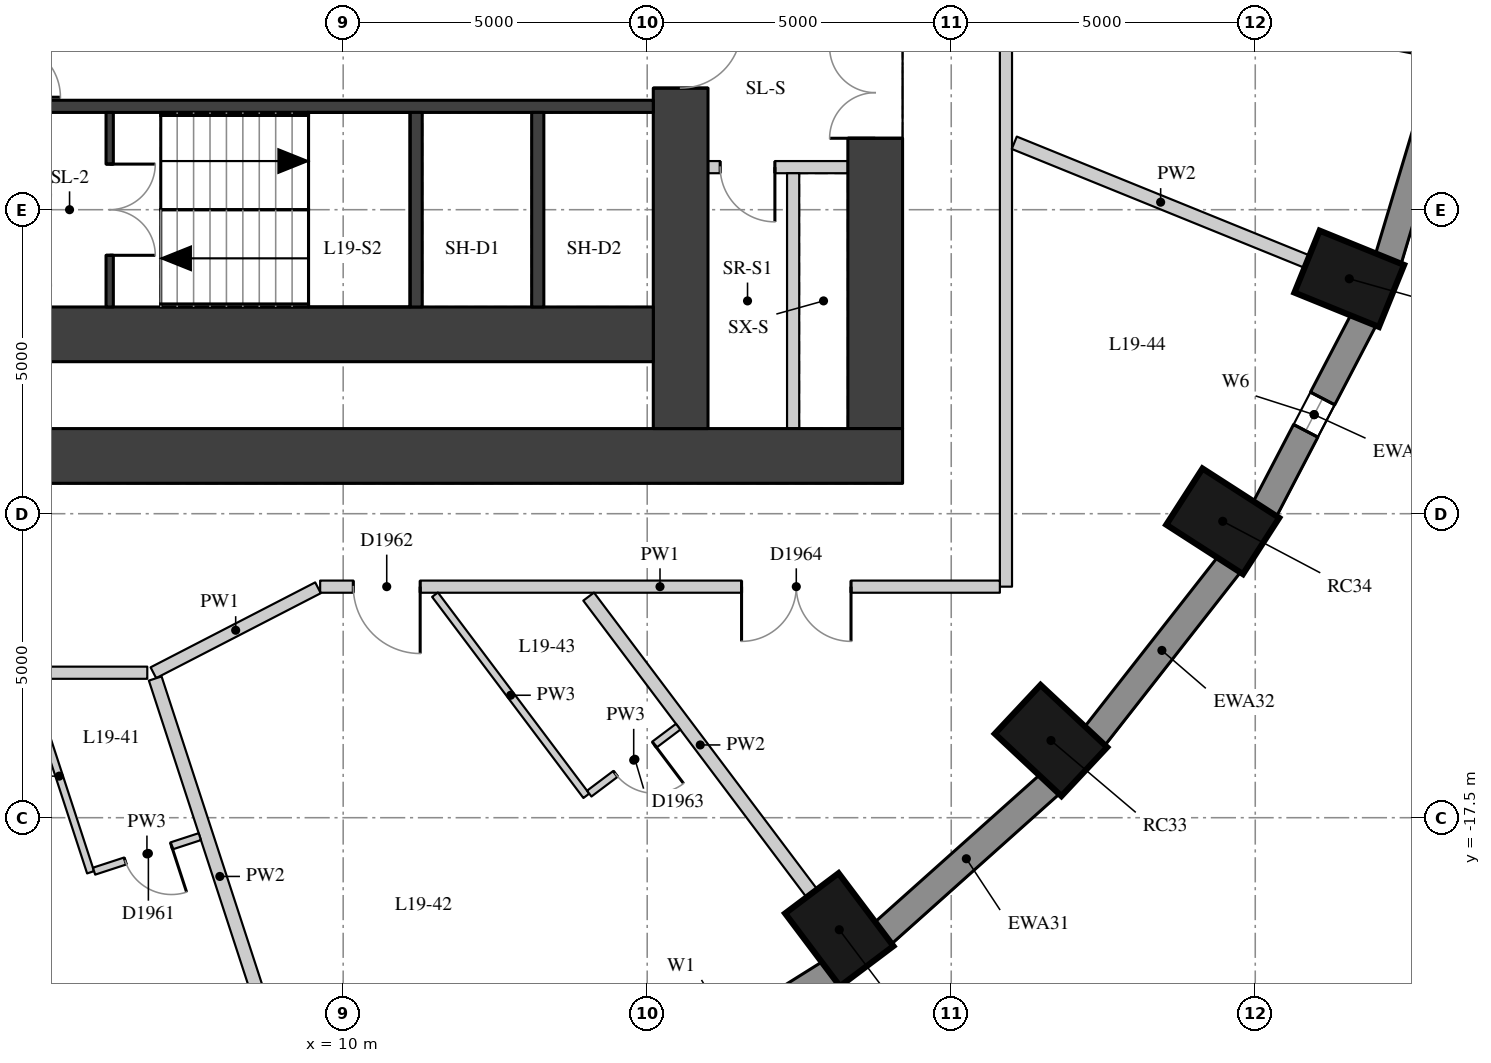
"""IFC4 building model, lengths in metres.
Left out: names, types, materials, properties, quantities, classifications, styles, units other than length and angle.
Written with IfcOpenShell. Run it as: python <this file> out.ifc"""

import sys

from ifc_helpers import new_model, si_unit, direction, frame, frame_2d, origin, origin_2d, place, context, subcontext, project, spatial, rectangle, extrude, element, fill, save


model = new_model("IFC4")
c1 = context("Model", 3, precision=1e-05, world=origin(), true_north=direction((0.0, 1.0)))
c2 = subcontext(c1, "Body", "Model", "MODEL_VIEW")
j1 = project(units=[si_unit("LENGTHUNIT", "METRE"), si_unit("PLANEANGLEUNIT", "RADIAN")], contexts=[c1])
p1 = place(None, origin())
s1 = spatial("IfcSite", under=j1, at=p1, CompositionType="ELEMENT")
p2 = place(p1, origin())
s2 = spatial("IfcBuilding", under=s1, at=p2, CompositionType="ELEMENT")
p3 = place(p2, frame((0.0, 0.0, 71.2)))
s3 = spatial("IfcBuildingStorey", under=s2, at=p3, CompositionType="ELEMENT", Elevation=71.2)
for number, where, z_axis, x_axis in (
    (1, (18.159, -19.343, 0.0), (0.0, 0.0, 1.0), (0.601, -0.799, 0.0)),
    (2, (21.641, -16.23, 0.0), (0.0, 0.0, 1.0), (0.73, -0.683, 0.0)),
    (3, (24.465, -12.625, 0.0), (0.0, 0.0, 1.0), (0.841, -0.541, 0.0)),
    (4, (26.546, -8.636, 0.0), (0.0, 0.0, 1.0), (0.927, -0.376, 0.0)),
    (5, (27.821, -4.385, 0.0), (0.0, 0.0, 1.0), (0.981, -0.193, 0.0)),
):
    element("IfcColumn", number, at=place(p3, frame(where, z_axis=z_axis, x_axis=x_axis)), inside=s3, PredefinedType="COLUMN", context=c2, shape_type="SweptSolid", body=[
        extrude(rectangle(XDim=1.5, YDim=1.1, at=origin_2d()), origin(), (0.0, 0.0, 1.0), 3.3),
    ])
p4 = place(p3, frame((14.817, -22.051, 0.0), z_axis=(0.0, 0.0, 1.0), x_axis=(0.847635480093, 0.530579016629, 0.0)))
e6 = element("IfcWall", 6, at=p4, inside=s3, PredefinedType="SOLIDWALL", context=c2, shape_type="SweptSolid", body=[
    extrude(rectangle(XDim=3.782, YDim=0.45, at=frame_2d((1.891, 0.0))), origin(), (0.0, 0.0, 1.0), 3.02),
])
p5 = place(p4, frame((0.791, 0.0, 0.4)))
e7 = element("IfcOpeningElement", 7, at=p5, cuts=e6, PredefinedType="OPENING", context=c2, shape_type="SweptSolid", body=[
    extrude(rectangle(XDim=2.2, YDim=1.75, at=frame_2d((1.1, 0.875))), frame((0.0, 0.235, 0.0), z_axis=(0.0, -1.0, 0.0), x_axis=(1.0, 0.0, 0.0)), (0.0, 0.0, 1.0), 0.47),
])
p6 = place(p3, frame((18.871, -19.407, 0.0), z_axis=(0.0, 0.0, 1.0), x_axis=(0.745526233716, 0.66647628228, 0.0)))
e8 = element("IfcWall", 8, at=p6, inside=s3, PredefinedType="SOLIDWALL", context=c2, shape_type="SweptSolid", body=[
    extrude(rectangle(XDim=3.697, YDim=0.45, at=frame_2d((1.848, 0.0))), origin(), (0.0, 0.0, 1.0), 3.02),
])
p7 = place(p3, frame((22.352, -16.17, 0.0), z_axis=(0.0, 0.0, 1.0), x_axis=(0.616661975264, 0.787228053529, 0.0)))
e9 = element("IfcWall", 9, at=p7, inside=s3, PredefinedType="SOLIDWALL", context=c2, shape_type="SweptSolid", body=[
    extrude(rectangle(XDim=3.61, YDim=0.45, at=frame_2d((1.805, 0.0))), origin(), (0.0, 0.0, 1.0), 3.02),
])
p8 = place(p3, frame((25.152, -12.437, 0.0), z_axis=(0.0, 0.0, 1.0), x_axis=(0.462492775226, 0.886623050041, 0.0)))
e10 = element("IfcWall", 10, at=p8, inside=s3, PredefinedType="SOLIDWALL", context=c2, shape_type="SweptSolid", body=[
    extrude(rectangle(XDim=3.532, YDim=0.45, at=frame_2d((1.766, 0.0))), origin(), (0.0, 0.0, 1.0), 3.02),
])
p9 = place(p8, frame((1.466, 0.0, 0.4)))
e11 = element("IfcOpeningElement", 11, at=p9, cuts=e10, PredefinedType="OPENING", context=c2, shape_type="SweptSolid", body=[
    extrude(rectangle(XDim=0.6, YDim=1.75, at=frame_2d((0.3, 0.875))), frame((0.0, 0.235, 0.0), z_axis=(0.0, -1.0, 0.0), x_axis=(1.0, 0.0, 0.0)), (0.0, 0.0, 1.0), 0.47),
])
p10 = place(p3, frame((27.185, -8.323, 0.0), z_axis=(0.0, 0.0, 1.0), x_axis=(0.287064133733, 0.957911364963, 0.0)))
e12 = element("IfcWall", 12, at=p10, inside=s3, PredefinedType="SOLIDWALL", context=c2, shape_type="SweptSolid", body=[
    extrude(rectangle(XDim=3.473, YDim=0.45, at=frame_2d((1.737, 0.0))), origin(), (0.0, 0.0, 1.0), 3.02),
])
p11 = place(p3, frame((18.75, -11.1, 0.0), z_axis=(0.0, 0.0, 1.0), x_axis=(0.0, 1.0, 0.0)))
e13 = element("IfcWall", 13, at=p11, inside=s3, PredefinedType="SHEAR", context=c2, shape_type="SweptSolid", body=[
    extrude(rectangle(XDim=22.2, YDim=0.9, at=frame_2d((11.1, 0.0))), origin(), (0.0, 0.0, 1.0), 3.02),
])
p12 = place(p11, frame((15.675, 0.0, 0.0)))
e14 = element("IfcOpeningElement", 14, at=p12, cuts=e13, PredefinedType="OPENING", context=c2, shape_type="SweptSolid", body=[
    extrude(rectangle(XDim=1.5, YDim=2.1, at=frame_2d((0.75, 1.05))), frame((0.0, 0.46, 0.0), z_axis=(0.0, -1.0, 0.0), x_axis=(1.0, 0.0, 0.0)), (0.0, 0.0, 1.0), 0.92),
])
p13 = place(p11, frame((4.775, 0.0, 0.0)))
e15 = element("IfcOpeningElement", 15, at=p13, cuts=e13, PredefinedType="OPENING", context=c2, shape_type="SweptSolid", body=[
    extrude(rectangle(XDim=1.5, YDim=2.1, at=frame_2d((0.75, 1.05))), frame((0.0, 0.46, 0.0), z_axis=(0.0, -1.0, 0.0), x_axis=(1.0, 0.0, 0.0)), (0.0, 0.0, 1.0), 0.92),
])
p14 = place(p3, frame((4.0, -11.55, 0.0), z_axis=(0.0, 0.0, 1.0), x_axis=(1.0, 0.0, 0.0)))
e16 = element("IfcWall", 16, at=p14, inside=s3, PredefinedType="SHEAR", context=c2, shape_type="SweptSolid", body=[
    extrude(rectangle(XDim=15.2, YDim=0.9, at=frame_2d((7.6, 0.0))), origin(), (0.0, 0.0, 1.0), 3.02),
])
p15 = place(p3, frame((15.55, -11.1, 0.0), z_axis=(0.0, 0.0, 1.0), x_axis=(0.0, 1.0, 0.0)))
e17 = element("IfcWall", 17, at=p15, inside=s3, PredefinedType="SHEAR", context=c2, shape_type="SweptSolid", body=[
    extrude(rectangle(XDim=22.2, YDim=0.9, at=frame_2d((11.1, 0.0))), origin(), (0.0, 0.0, 1.0), 3.02),
])
p16 = place(p15, frame((15.6, 0.0, 0.0)))
e18 = element("IfcOpeningElement", 18, at=p16, cuts=e17, PredefinedType="OPENING", context=c2, shape_type="SweptSolid", body=[
    extrude(rectangle(XDim=1.0, YDim=2.1, at=frame_2d((0.5, 1.05))), frame((0.0, 0.46, 0.0), z_axis=(0.0, -1.0, 0.0), x_axis=(1.0, 0.0, 0.0)), (0.0, 0.0, 1.0), 0.92),
])
p17 = place(p15, frame((5.6, 0.0, 0.0)))
e19 = element("IfcOpeningElement", 19, at=p17, cuts=e17, PredefinedType="OPENING", context=c2, shape_type="SweptSolid", body=[
    extrude(rectangle(XDim=1.0, YDim=2.1, at=frame_2d((0.5, 1.05))), frame((0.0, 0.46, 0.0), z_axis=(0.0, -1.0, 0.0), x_axis=(1.0, 0.0, 0.0)), (0.0, 0.0, 1.0), 0.92),
])
p18 = place(p3, frame((4.9, -9.55, 0.0), z_axis=(0.0, 0.0, 1.0), x_axis=(1.0, 0.0, 0.0)))
e20 = element("IfcWall", 20, at=p18, inside=s3, PredefinedType="SHEAR", context=c2, shape_type="SweptSolid", body=[
    extrude(rectangle(XDim=10.2, YDim=0.9, at=frame_2d((5.1, 0.0))), origin(), (0.0, 0.0, 1.0), 3.02),
])
p19 = place(p3, frame((4.9, -5.8, 0.0), z_axis=(0.0, 0.0, 1.0), x_axis=(1.0, 0.0, 0.0)))
e21 = element("IfcWall", 21, at=p19, inside=s3, PredefinedType="SHEAR", context=c2, shape_type="SweptSolid", body=[
    extrude(rectangle(XDim=10.2, YDim=0.2, at=frame_2d((5.1, 0.0))), origin(), (0.0, 0.0, 1.0), 3.02),
])
for number, where, z_axis, x_axis in (
    (22, (11.2, -9.1, 0.0), (0.0, 0.0, 1.0), (0.0, 1.0, 0.0)),
    (23, (13.2, -9.1, 0.0), (0.0, 0.0, 1.0), (0.0, 1.0, 0.0)),
):
    element("IfcWall", number, at=place(p3, frame(where, z_axis=z_axis, x_axis=x_axis)), inside=s3, PredefinedType="SHEAR", context=c2, shape_type="SweptSolid", body=[
        extrude(rectangle(XDim=3.2, YDim=0.2, at=frame_2d((1.6, 0.0))), origin(), (0.0, 0.0, 1.0), 3.02),
    ])
p20 = place(p3, frame((6.16, -9.1, 0.0), z_axis=(0.0, 0.0, 1.0), x_axis=(0.0, 1.0, 0.0)))
e24 = element("IfcWall", 24, at=p20, inside=s3, PredefinedType="SHEAR", context=c2, shape_type="SweptSolid", body=[
    extrude(rectangle(XDim=3.2, YDim=0.12, at=frame_2d((1.6, 0.0))), origin(), (0.0, 0.0, 1.0), 3.02),
])
p21 = place(p20, frame((0.85, 0.0, 0.0)))
e25 = element("IfcOpeningElement", 25, at=p21, cuts=e24, PredefinedType="OPENING", context=c2, shape_type="SweptSolid", body=[
    extrude(rectangle(XDim=1.5, YDim=2.1, at=frame_2d((0.75, 1.05))), frame((0.0, 0.07, 0.0), z_axis=(0.0, -1.0, 0.0), x_axis=(1.0, 0.0, 0.0)), (0.0, 0.0, 1.0), 0.14),
])
p22 = place(p3, frame((16.0, -6.8, 0.0), z_axis=(0.0, 0.0, 1.0), x_axis=(1.0, 0.0, 0.0)))
e26 = element("IfcWall", 26, at=p22, inside=s3, PredefinedType="PARTITIONING", context=c2, shape_type="SweptSolid", body=[
    extrude(rectangle(XDim=2.3, YDim=0.2, at=frame_2d((1.15, 0.0))), origin(), (0.0, 0.0, 1.0), 3.02),
])
p23 = place(p22, frame((0.2, 0.0, 0.0)))
e27 = element("IfcOpeningElement", 27, at=p23, cuts=e26, PredefinedType="OPENING", context=c2, shape_type="SweptSolid", body=[
    extrude(rectangle(XDim=0.9, YDim=2.1, at=frame_2d((0.45, 1.05))), frame((0.0, 0.11, 0.0), z_axis=(0.0, -1.0, 0.0), x_axis=(1.0, 0.0, 0.0)), (0.0, 0.0, 1.0), 0.22),
])
p24 = place(p3, frame((17.4, -11.1, 0.0), z_axis=(0.0, 0.0, 1.0), x_axis=(0.0, 1.0, 0.0)))
e28 = element("IfcWall", 28, at=p24, inside=s3, PredefinedType="PARTITIONING", context=c2, shape_type="SweptSolid", body=[
    extrude(rectangle(XDim=4.2, YDim=0.2, at=frame_2d((2.1, 0.0))), origin(), (0.0, 0.0, 1.0), 3.02),
])
p25 = place(p3, frame((20.9, 13.7, 0.0), z_axis=(0.0, 0.0, 1.0), x_axis=(0.0, -1.0, 0.0)))
e29 = element("IfcWall", 29, at=p25, inside=s3, PredefinedType="PARTITIONING", context=c2, shape_type="SweptSolid", body=[
    extrude(rectangle(XDim=27.4, YDim=0.2, at=frame_2d((13.7, 0.0))), origin(), (0.0, 0.0, 1.0), 3.02),
])
p26 = place(p25, frame((16.523, 0.0, 0.0)))
e30 = element("IfcOpeningElement", 30, at=p26, cuts=e29, PredefinedType="OPENING", context=c2, shape_type="SweptSolid", body=[
    extrude(rectangle(XDim=0.9, YDim=2.1, at=frame_2d((0.45, 1.05))), frame((0.0, 0.11, 0.0), z_axis=(0.0, -1.0, 0.0), x_axis=(1.0, 0.0, 0.0)), (0.0, 0.0, 1.0), 0.22),
])
p27 = place(p25, frame((7.635, 0.0, 0.0)))
e31 = element("IfcOpeningElement", 31, at=p27, cuts=e29, PredefinedType="OPENING", context=c2, shape_type="SweptSolid", body=[
    extrude(rectangle(XDim=1.8, YDim=2.1, at=frame_2d((0.9, 1.05))), frame((0.0, 0.11, 0.0), z_axis=(0.0, -1.0, 0.0), x_axis=(1.0, 0.0, 0.0)), (0.0, 0.0, 1.0), 0.22),
])
p28 = place(p3, frame((20.8, -13.7, 0.0), z_axis=(0.0, 0.0, 1.0), x_axis=(-1.0, 0.0, 0.0)))
e32 = element("IfcWall", 32, at=p28, inside=s3, PredefinedType="PARTITIONING", context=c2, shape_type="SweptSolid", body=[
    extrude(rectangle(XDim=11.178, YDim=0.2, at=frame_2d((5.589, 0.0))), origin(), (0.0, 0.0, 1.0), 3.02),
])
p29 = place(p28, frame((9.534, 0.0, 0.0)))
e33 = element("IfcOpeningElement", 33, at=p29, cuts=e32, PredefinedType="OPENING", context=c2, shape_type="SweptSolid", body=[
    extrude(rectangle(XDim=1.1, YDim=2.1, at=frame_2d((0.55, 1.05))), frame((0.0, 0.11, 0.0), z_axis=(0.0, -1.0, 0.0), x_axis=(1.0, 0.0, 0.0)), (0.0, 0.0, 1.0), 0.22),
])
p30 = place(p28, frame((2.448, 0.0, 0.0)))
e34 = element("IfcOpeningElement", 34, at=p30, cuts=e32, PredefinedType="OPENING", context=c2, shape_type="SweptSolid", body=[
    extrude(rectangle(XDim=1.8, YDim=2.1, at=frame_2d((0.9, 1.05))), frame((0.0, 0.11, 0.0), z_axis=(0.0, -1.0, 0.0), x_axis=(1.0, 0.0, 0.0)), (0.0, 0.0, 1.0), 0.22),
])
p31 = place(p3, frame((9.586, -13.719, 0.0), z_axis=(0.0, 0.0, 1.0), x_axis=(-0.888664904046, -0.458557181076, 0.0)))
e35 = element("IfcWall", 35, at=p31, inside=s3, PredefinedType="PARTITIONING", context=c2, shape_type="SweptSolid", body=[
    extrude(rectangle(XDim=3.046, YDim=0.2, at=frame_2d((1.523, 0.0))), origin(), (0.0, 0.0, 1.0), 3.02),
])
p32 = place(p3, frame((6.778, -15.115, 0.0), z_axis=(0.0, 0.0, 1.0), x_axis=(-1.0, 0.0, 0.0)))
e36 = element("IfcWall", 36, at=p32, inside=s3, PredefinedType="PARTITIONING", context=c2, shape_type="SweptSolid", body=[
    extrude(rectangle(XDim=13.657, YDim=0.2, at=frame_2d((6.828, 0.0))), origin(), (0.0, 0.0, 1.0), 2.42),
])
p33 = place(p32, frame((10.843, 0.0, 0.0)))
e37 = element("IfcOpeningElement", 37, at=p33, cuts=e36, PredefinedType="OPENING", context=c2, shape_type="SweptSolid", body=[
    extrude(rectangle(XDim=1.0, YDim=2.1, at=frame_2d((0.5, 1.05))), frame((0.0, 0.11, 0.0), z_axis=(0.0, -1.0, 0.0), x_axis=(1.0, 0.0, 0.0)), (0.0, 0.0, 1.0), 0.22),
])
p34 = place(p32, frame((4.505, 0.0, 0.0)))
e38 = element("IfcOpeningElement", 38, at=p34, cuts=e36, PredefinedType="OPENING", context=c2, shape_type="SweptSolid", body=[
    extrude(rectangle(XDim=1.1, YDim=2.1, at=frame_2d((0.55, 1.05))), frame((0.0, 0.11, 0.0), z_axis=(0.0, -1.0, 0.0), x_axis=(1.0, 0.0, 0.0)), (0.0, 0.0, 1.0), 0.22),
])
p35 = place(p3, frame((9.034, -21.721, 0.0), z_axis=(0.0, 0.0, 1.0), x_axis=(-0.310286072156, 0.95064323141, 0.0)))
e39 = element("IfcWall", 39, at=p35, inside=s3, PredefinedType="PARTITIONING", context=c2, shape_type="SweptSolid", body=[
    extrude(rectangle(XDim=6.849, YDim=0.22, at=frame_2d((3.424, 0.0))), origin(), (0.0, 0.0, 1.0), 3.02),
])
p36 = place(p3, frame((17.708, -18.743, 0.0), z_axis=(0.0, 0.0, 1.0), x_axis=(-0.601170031872, 0.799121137738, 0.0)))
e40 = element("IfcWall", 40, at=p36, inside=s3, PredefinedType="PARTITIONING", context=c2, shape_type="SweptSolid", body=[
    extrude(rectangle(XDim=6.106, YDim=0.22, at=frame_2d((3.053, 0.0))), origin(), (0.0, 0.0, 1.0), 3.02),
])
p37 = place(p3, frame((25.851, -8.354, 0.0), z_axis=(0.0, 0.0, 1.0), x_axis=(-0.926545919269, 0.376181684145, 0.0)))
e41 = element("IfcWall", 41, at=p37, inside=s3, PredefinedType="PARTITIONING", context=c2, shape_type="SweptSolid", body=[
    extrude(rectangle(XDim=5.196, YDim=0.22, at=frame_2d((2.598, 0.0))), origin(), (0.0, 0.0, 1.0), 3.02),
])
p38 = place(p3, frame((4.813, -15.235, 0.0), z_axis=(0.0, 0.0, 1.0), x_axis=(0.310233981264, -0.950660232086, 0.0)))
e42 = element("IfcWall", 42, at=p38, inside=s3, PredefinedType="PARTITIONING", context=c2, shape_type="SweptSolid", body=[
    extrude(rectangle(XDim=3.327, YDim=0.12, at=frame_2d((1.664, 0.0))), origin(), (0.0, 0.0, 1.0), 3.02),
])
p39 = place(p3, frame((11.51, -13.832, 0.0), z_axis=(0.0, 0.0, 1.0), x_axis=(0.60115060605, -0.7991357512, 0.0)))
e43 = element("IfcWall", 43, at=p39, inside=s3, PredefinedType="PARTITIONING", context=c2, shape_type="SweptSolid", body=[
    extrude(rectangle(XDim=4.14, YDim=0.12, at=frame_2d((2.07, 0.0))), origin(), (0.0, 0.0, 1.0), 3.02),
])
p40 = place(p3, frame((5.903, -18.379, 0.0), z_axis=(0.0, 0.0, 1.0), x_axis=(0.950626343776, 0.310337807105, 0.0)))
e44 = element("IfcWall", 44, at=p40, inside=s3, PredefinedType="PARTITIONING", context=c2, shape_type="SweptSolid", body=[
    extrude(rectangle(XDim=1.83, YDim=0.12, at=frame_2d((0.915, 0.0))), origin(), (0.0, 0.0, 1.0), 3.02),
])
p41 = place(p40, frame((0.54, 0.0, 0.0)))
e45 = element("IfcOpeningElement", 45, at=p41, cuts=e44, PredefinedType="OPENING", context=c2, shape_type="SweptSolid", body=[
    extrude(rectangle(XDim=0.8, YDim=2.1, at=frame_2d((0.4, 1.05))), frame((0.0, 0.07, 0.0), z_axis=(0.0, -1.0, 0.0), x_axis=(1.0, 0.0, 0.0)), (0.0, 0.0, 1.0), 0.14),
])
p42 = place(p3, frame((14.047, -17.104, 0.0), z_axis=(0.0, 0.0, 1.0), x_axis=(0.799182868338, 0.601087966071, 0.0)))
e46 = element("IfcWall", 46, at=p42, inside=s3, PredefinedType="PARTITIONING", context=c2, shape_type="SweptSolid", body=[
    extrude(rectangle(XDim=1.83, YDim=0.12, at=frame_2d((0.915, 0.0))), origin(), (0.0, 0.0, 1.0), 3.02),
])
p43 = place(p42, frame((0.54, 0.0, 0.0)))
e47 = element("IfcOpeningElement", 47, at=p43, cuts=e46, PredefinedType="OPENING", context=c2, shape_type="SweptSolid", body=[
    extrude(rectangle(XDim=0.8, YDim=2.1, at=frame_2d((0.4, 1.05))), frame((0.0, 0.07, 0.0), z_axis=(0.0, -1.0, 0.0), x_axis=(1.0, 0.0, 0.0)), (0.0, 0.0, 1.0), 0.14),
])
p44 = place(p9, origin())
e48 = element("IfcWindow", 48, at=p44, inside=s3, PartitioningType="SINGLE_PANEL", PredefinedType="WINDOW", context=c2, shape_type="SweptSolid", body=[
    extrude(rectangle(XDim=0.6, YDim=1.75, at=frame_2d((0.3, 0.875))), frame((0.0, 0.035, 0.0), z_axis=(0.0, -1.0, 0.0), x_axis=(1.0, 0.0, 0.0)), (0.0, 0.0, 1.0), 0.06),
])
fill(e11, e48)
p45 = place(p13, origin())
e49 = element("IfcDoor", 49, at=p45, inside=s3, OperationType="DOUBLE_DOOR_SINGLE_SWING", PredefinedType="DOOR", context=c2, shape_type="SweptSolid", body=[
    extrude(rectangle(XDim=1.5, YDim=2.1, at=frame_2d((0.75, 1.05))), frame((0.0, 0.025, 0.0), z_axis=(0.0, -1.0, 0.0), x_axis=(1.0, 0.0, 0.0)), (0.0, 0.0, 1.0), 0.05),
])
fill(e15, e49)
p46 = place(p21, origin())
e50 = element("IfcDoor", 50, at=p46, inside=s3, OperationType="DOUBLE_DOOR_SINGLE_SWING", PredefinedType="DOOR", context=c2, shape_type="SweptSolid", body=[
    extrude(rectangle(XDim=1.5, YDim=2.1, at=frame_2d((0.75, 1.05))), frame((0.0, 0.025, 0.0), z_axis=(0.0, -1.0, 0.0), x_axis=(1.0, 0.0, 0.0)), (0.0, 0.0, 1.0), 0.05),
])
fill(e25, e50)
p47 = place(p17, origin())
e51 = element("IfcDoor", 51, at=p47, inside=s3, OperationType="SINGLE_SWING_LEFT", PredefinedType="DOOR", context=c2, shape_type="SweptSolid", body=[
    extrude(rectangle(XDim=1.0, YDim=2.1, at=frame_2d((0.5, 1.05))), frame((0.0, 0.025, 0.0), z_axis=(0.0, -1.0, 0.0), x_axis=(1.0, 0.0, 0.0)), (0.0, 0.0, 1.0), 0.05),
])
fill(e19, e51)
p48 = place(p23, origin())
e52 = element("IfcDoor", 52, at=p48, inside=s3, OperationType="SINGLE_SWING_LEFT", PredefinedType="DOOR", context=c2, shape_type="SweptSolid", body=[
    extrude(rectangle(XDim=0.9, YDim=2.1, at=frame_2d((0.45, 1.05))), frame((0.0, 0.025, 0.0), z_axis=(0.0, -1.0, 0.0), x_axis=(1.0, 0.0, 0.0)), (0.0, 0.0, 1.0), 0.05),
])
fill(e27, e52)
p49 = place(p41, origin())
e53 = element("IfcDoor", 53, at=p49, inside=s3, OperationType="SINGLE_SWING_LEFT", PredefinedType="DOOR", context=c2, shape_type="SweptSolid", body=[
    extrude(rectangle(XDim=0.8, YDim=2.1, at=frame_2d((0.4, 1.05))), frame((0.0, 0.025, 0.0), z_axis=(0.0, -1.0, 0.0), x_axis=(1.0, 0.0, 0.0)), (0.0, 0.0, 1.0), 0.05),
])
fill(e45, e53)
p50 = place(p29, origin())
e54 = element("IfcDoor", 54, at=p50, inside=s3, OperationType="SINGLE_SWING_LEFT", PredefinedType="DOOR", context=c2, shape_type="SweptSolid", body=[
    extrude(rectangle(XDim=1.1, YDim=2.1, at=frame_2d((0.55, 1.05))), frame((0.0, 0.025, 0.0), z_axis=(0.0, -1.0, 0.0), x_axis=(1.0, 0.0, 0.0)), (0.0, 0.0, 1.0), 0.05),
])
fill(e33, e54)
p51 = place(p43, origin())
e55 = element("IfcDoor", 55, at=p51, inside=s3, OperationType="SINGLE_SWING_LEFT", PredefinedType="DOOR", context=c2, shape_type="SweptSolid", body=[
    extrude(rectangle(XDim=0.8, YDim=2.1, at=frame_2d((0.4, 1.05))), frame((0.0, 0.025, 0.0), z_axis=(0.0, -1.0, 0.0), x_axis=(1.0, 0.0, 0.0)), (0.0, 0.0, 1.0), 0.05),
])
fill(e47, e55)
p52 = place(p30, origin())
e56 = element("IfcDoor", 56, at=p52, inside=s3, OperationType="DOUBLE_DOOR_SINGLE_SWING", PredefinedType="DOOR", context=c2, shape_type="SweptSolid", body=[
    extrude(rectangle(XDim=1.8, YDim=2.1, at=frame_2d((0.9, 1.05))), frame((0.0, 0.025, 0.0), z_axis=(0.0, -1.0, 0.0), x_axis=(1.0, 0.0, 0.0)), (0.0, 0.0, 1.0), 0.05),
])
fill(e34, e56)
save(model, sys.argv[1])
